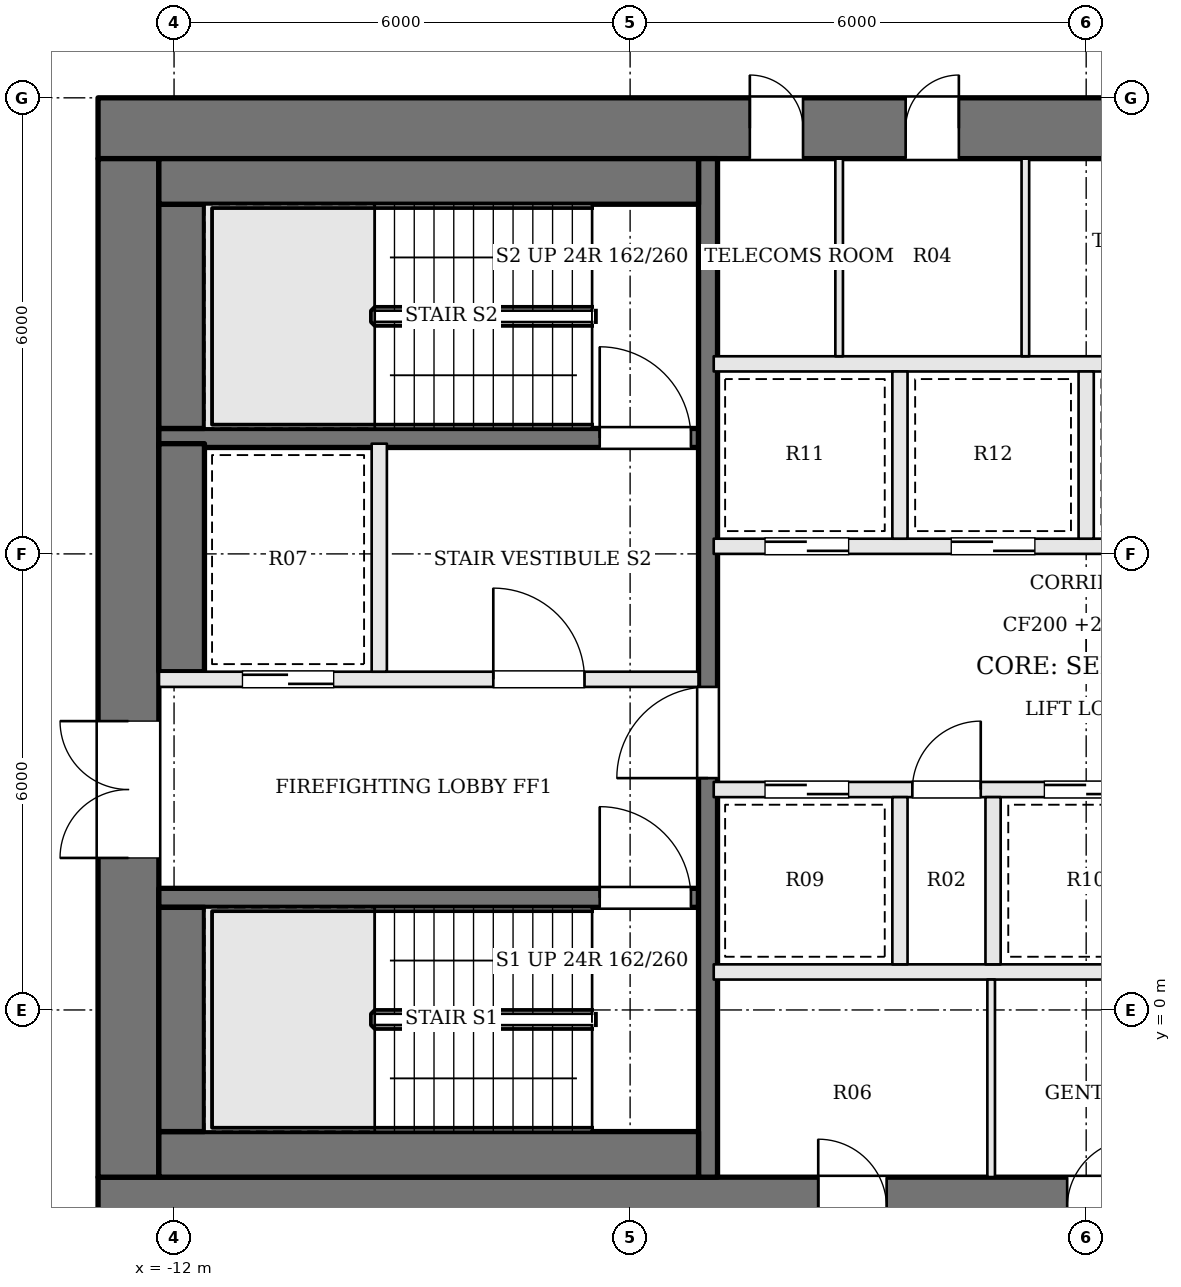
"""IFC4 building model, lengths in metres.
Left out: names, types, materials, properties, quantities, classifications, styles, units other than length and angle.
Written with IfcOpenShell. Run it as: python <this file> out.ifc"""

import sys

from ifc_helpers import new_model, si_unit, direction, frame, frame_2d, origin, place, context, subcontext, project, spatial, rectangle, extrude, element, fill, save


model = new_model("IFC4")
c1 = context("Model", 3, precision=1e-05, world=origin(), true_north=direction((0.0, 1.0)))
c2 = subcontext(c1, "Body", "Model", "MODEL_VIEW")
j1 = project(units=[si_unit("LENGTHUNIT", "METRE"), si_unit("PLANEANGLEUNIT", "RADIAN")], contexts=[c1])
p1 = place(None, origin())
s1 = spatial("IfcSite", under=j1, at=p1, CompositionType="ELEMENT")
p2 = place(p1, origin())
s2 = spatial("IfcBuilding", under=s1, at=p2, CompositionType="ELEMENT")
p3 = place(p2, frame((0.0, 0.0, 229.2)))
s3 = spatial("IfcBuildingStorey", under=s2, at=p3, CompositionType="ELEMENT", Elevation=229.2)
p4 = place(p3, frame((-13.0, 11.6, 0.0), z_axis=(0.0, 0.0, 1.0), x_axis=(1.0, 0.0, 0.0)))
e1 = element("IfcWall", 1, at=p4, inside=s3, PredefinedType="SHEAR", context=c2, shape_type="SweptSolid", body=[
    extrude(rectangle(XDim=26.0, YDim=0.8, at=frame_2d((13.0, 0.0))), origin(), (0.0, 0.0, 1.0), 3.9),
])
p5 = place(p4, frame((8.575, 0.0, 0.0)))
e2 = element("IfcOpeningElement", 2, at=p5, cuts=e1, PredefinedType="OPENING", context=c2, shape_type="SweptSolid", body=[
    extrude(rectangle(XDim=0.7, YDim=2.1, at=frame_2d((0.35, 1.05))), frame((0.0, 0.41, 0.0), z_axis=(0.0, -1.0, 0.0), x_axis=(1.0, 0.0, 0.0)), (0.0, 0.0, 1.0), 0.82),
])
p6 = place(p4, frame((10.625, 0.0, 0.0)))
e3 = element("IfcOpeningElement", 3, at=p6, cuts=e1, PredefinedType="OPENING", context=c2, shape_type="SweptSolid", body=[
    extrude(rectangle(XDim=0.7, YDim=2.1, at=frame_2d((0.35, 1.05))), frame((0.0, 0.41, 0.0), z_axis=(0.0, -1.0, 0.0), x_axis=(1.0, 0.0, 0.0)), (0.0, 0.0, 1.0), 0.82),
])
p7 = place(p4, frame((13.325, 0.0, 0.0)))
e4 = element("IfcOpeningElement", 4, at=p7, cuts=e1, PredefinedType="OPENING", context=c2, shape_type="SweptSolid", body=[
    extrude(rectangle(XDim=1.0, YDim=2.1, at=frame_2d((0.5, 1.05))), frame((0.0, 0.41, 0.0), z_axis=(0.0, -1.0, 0.0), x_axis=(1.0, 0.0, 0.0)), (0.0, 0.0, 1.0), 0.82),
])
p8 = place(p4, frame((15.65, 0.0, 0.0)))
e5 = element("IfcOpeningElement", 5, at=p8, cuts=e1, PredefinedType="OPENING", context=c2, shape_type="SweptSolid", body=[
    extrude(rectangle(XDim=1.0, YDim=2.1, at=frame_2d((0.5, 1.05))), frame((0.0, 0.41, 0.0), z_axis=(0.0, -1.0, 0.0), x_axis=(1.0, 0.0, 0.0)), (0.0, 0.0, 1.0), 0.82),
])
p9 = place(p3, frame((-13.0, -2.6, 0.0), z_axis=(0.0, 0.0, 1.0), x_axis=(1.0, 0.0, 0.0)))
e6 = element("IfcWall", 6, at=p9, inside=s3, PredefinedType="SHEAR", context=c2, shape_type="SweptSolid", body=[
    extrude(rectangle(XDim=26.0, YDim=0.8, at=frame_2d((13.0, 0.0))), origin(), (0.0, 0.0, 1.0), 3.9),
])
p10 = place(p9, frame((9.475, 0.0, 0.0)))
e7 = element("IfcOpeningElement", 7, at=p10, cuts=e6, PredefinedType="OPENING", context=c2, shape_type="SweptSolid", body=[
    extrude(rectangle(XDim=0.9, YDim=2.1, at=frame_2d((0.45, 1.05))), frame((0.0, 0.41, 0.0), z_axis=(0.0, -1.0, 0.0), x_axis=(1.0, 0.0, 0.0)), (0.0, 0.0, 1.0), 0.82),
])
p11 = place(p9, frame((12.75, 0.0, 0.0)))
e8 = element("IfcOpeningElement", 8, at=p11, cuts=e6, PredefinedType="OPENING", context=c2, shape_type="SweptSolid", body=[
    extrude(rectangle(XDim=0.9, YDim=2.1, at=frame_2d((0.45, 1.05))), frame((0.0, 0.41, 0.0), z_axis=(0.0, -1.0, 0.0), x_axis=(1.0, 0.0, 0.0)), (0.0, 0.0, 1.0), 0.82),
])
p12 = place(p9, frame((15.05, 0.0, 0.0)))
e9 = element("IfcOpeningElement", 9, at=p12, cuts=e6, PredefinedType="OPENING", context=c2, shape_type="SweptSolid", body=[
    extrude(rectangle(XDim=1.0, YDim=2.1, at=frame_2d((0.5, 1.05))), frame((0.0, 0.41, 0.0), z_axis=(0.0, -1.0, 0.0), x_axis=(1.0, 0.0, 0.0)), (0.0, 0.0, 1.0), 0.82),
])
p13 = place(p9, frame((16.825, 0.0, 0.0)))
e10 = element("IfcOpeningElement", 10, at=p13, cuts=e6, PredefinedType="OPENING", context=c2, shape_type="SweptSolid", body=[
    extrude(rectangle(XDim=0.7, YDim=2.1, at=frame_2d((0.35, 1.05))), frame((0.0, 0.41, 0.0), z_axis=(0.0, -1.0, 0.0), x_axis=(1.0, 0.0, 0.0)), (0.0, 0.0, 1.0), 0.82),
])
p14 = place(p3, frame((-12.6, -2.2, 0.0), z_axis=(0.0, 0.0, 1.0), x_axis=(0.0, 1.0, 0.0)))
e11 = element("IfcWall", 11, at=p14, inside=s3, PredefinedType="SHEAR", context=c2, shape_type="SweptSolid", body=[
    extrude(rectangle(XDim=13.4, YDim=0.8, at=frame_2d((6.7, 0.0))), origin(), (0.0, 0.0, 1.0), 3.9),
])
p15 = place(p14, frame((4.2, 0.0, 0.0)))
e12 = element("IfcOpeningElement", 12, at=p15, cuts=e11, PredefinedType="OPENING", context=c2, shape_type="SweptSolid", body=[
    extrude(rectangle(XDim=1.8, YDim=2.1, at=frame_2d((0.9, 1.05))), frame((0.0, 0.41, 0.0), z_axis=(0.0, -1.0, 0.0), x_axis=(1.0, 0.0, 0.0)), (0.0, 0.0, 1.0), 0.82),
])
p16 = place(p3, frame((-12.2, 1.475, 0.0), z_axis=(0.0, 0.0, 1.0), x_axis=(1.0, 0.0, 0.0)))
e13 = element("IfcWall", 13, at=p16, inside=s3, PredefinedType="SOLIDWALL", context=c2, shape_type="SweptSolid", body=[
    extrude(rectangle(XDim=7.1, YDim=0.25, at=frame_2d((3.55, 0.0))), origin(), (0.0, 0.0, 1.0), 3.7),
])
p17 = place(p16, frame((5.8, 0.0, 0.0)))
e14 = element("IfcOpeningElement", 14, at=p17, cuts=e13, PredefinedType="OPENING", context=c2, shape_type="SweptSolid", body=[
    extrude(rectangle(XDim=1.2, YDim=2.1, at=frame_2d((0.6, 1.05))), frame((0.0, 0.135, 0.0), z_axis=(0.0, -1.0, 0.0), x_axis=(1.0, 0.0, 0.0)), (0.0, 0.0, 1.0), 0.27),
])
p18 = place(p3, frame((-12.2, 4.35, 0.0), z_axis=(0.0, 0.0, 1.0), x_axis=(1.0, 0.0, 0.0)))
e15 = element("IfcWall", 15, at=p18, inside=s3, PredefinedType="SOLIDWALL", context=c2, shape_type="SweptSolid", body=[
    extrude(rectangle(XDim=7.1, YDim=0.2, at=frame_2d((3.55, 0.0))), origin(), (0.0, 0.0, 1.0), 3.7),
])
p19 = place(p18, frame((4.4, 0.0, 0.0)))
e16 = element("IfcOpeningElement", 16, at=p19, cuts=e15, PredefinedType="OPENING", context=c2, shape_type="SweptSolid", body=[
    extrude(rectangle(XDim=1.2, YDim=2.1, at=frame_2d((0.6, 1.05))), frame((0.0, 0.11, 0.0), z_axis=(0.0, -1.0, 0.0), x_axis=(1.0, 0.0, 0.0)), (0.0, 0.0, 1.0), 0.22),
])
p20 = place(p18, frame((1.1, 0.0, 0.0)))
e17 = element("IfcOpeningElement", 17, at=p20, cuts=e15, PredefinedType="OPENING", context=c2, shape_type="SweptSolid", body=[
    extrude(rectangle(XDim=1.2, YDim=2.1, at=frame_2d((0.6, 1.05))), frame((0.0, 0.11, 0.0), z_axis=(0.0, -1.0, 0.0), x_axis=(1.0, 0.0, 0.0)), (0.0, 0.0, 1.0), 0.22),
])
p21 = place(p3, frame((-12.2, 7.525, 0.0), z_axis=(0.0, 0.0, 1.0), x_axis=(1.0, 0.0, 0.0)))
e18 = element("IfcWall", 18, at=p21, inside=s3, PredefinedType="SOLIDWALL", context=c2, shape_type="SweptSolid", body=[
    extrude(rectangle(XDim=7.1, YDim=0.25, at=frame_2d((3.55, 0.0))), origin(), (0.0, 0.0, 1.0), 3.7),
])
p22 = place(p21, frame((5.8, 0.0, 0.0)))
e19 = element("IfcOpeningElement", 19, at=p22, cuts=e18, PredefinedType="OPENING", context=c2, shape_type="SweptSolid", body=[
    extrude(rectangle(XDim=1.2, YDim=2.1, at=frame_2d((0.6, 1.05))), frame((0.0, 0.135, 0.0), z_axis=(0.0, -1.0, 0.0), x_axis=(1.0, 0.0, 0.0)), (0.0, 0.0, 1.0), 0.27),
])
p23 = place(p3, frame((-9.3, 4.45, 0.0), z_axis=(0.0, 0.0, 1.0), x_axis=(0.0, 1.0, 0.0)))
e20 = element("IfcWall", 20, at=p23, inside=s3, PredefinedType="SOLIDWALL", context=c2, shape_type="SweptSolid", body=[
    extrude(rectangle(XDim=3.0, YDim=0.2, at=frame_2d((1.5, 0.0))), origin(), (0.0, 0.0, 1.0), 3.7),
])
p24 = place(p3, frame((-4.975, -2.2, 0.0), z_axis=(0.0, 0.0, 1.0), x_axis=(0.0, 1.0, 0.0)))
e21 = element("IfcWall", 21, at=p24, inside=s3, PredefinedType="SOLIDWALL", context=c2, shape_type="SweptSolid", body=[
    extrude(rectangle(XDim=13.4, YDim=0.25, at=frame_2d((6.7, 0.0))), origin(), (0.0, 0.0, 1.0), 3.7),
])
p25 = place(p24, frame((5.25, 0.0, 0.0)))
e22 = element("IfcOpeningElement", 22, at=p25, cuts=e21, PredefinedType="OPENING", context=c2, shape_type="SweptSolid", body=[
    extrude(rectangle(XDim=1.2, YDim=2.1, at=frame_2d((0.6, 1.05))), frame((0.0, 0.135, 0.0), z_axis=(0.0, -1.0, 0.0), x_axis=(1.0, 0.0, 0.0)), (0.0, 0.0, 1.0), 0.27),
])
p26 = place(p3, frame((-12.2, -1.9, 0.0), z_axis=(0.0, 0.0, 1.0), x_axis=(1.0, 0.0, 0.0)))
e23 = element("IfcWall", 23, at=p26, inside=s3, PredefinedType="SOLIDWALL", context=c2, shape_type="SweptSolid", body=[
    extrude(rectangle(XDim=7.1, YDim=0.6, at=frame_2d((3.55, 0.0))), origin(), (0.0, 0.0, 1.0), 3.7),
])
p27 = place(p3, frame((-11.9, -1.6, 0.0), z_axis=(0.0, 0.0, 1.0), x_axis=(0.0, 1.0, 0.0)))
e24 = element("IfcWall", 24, at=p27, inside=s3, PredefinedType="SOLIDWALL", context=c2, shape_type="SweptSolid", body=[
    extrude(rectangle(XDim=2.95, YDim=0.6, at=frame_2d((1.475, 0.0))), origin(), (0.0, 0.0, 1.0), 3.7),
])
p28 = place(p3, frame((-11.9, 4.45, 0.0), z_axis=(0.0, 0.0, 1.0), x_axis=(0.0, 1.0, 0.0)))
e25 = element("IfcWall", 25, at=p28, inside=s3, PredefinedType="SOLIDWALL", context=c2, shape_type="SweptSolid", body=[
    extrude(rectangle(XDim=3.0, YDim=0.6, at=frame_2d((1.5, 0.0))), origin(), (0.0, 0.0, 1.0), 3.7),
])
p29 = place(p3, frame((-11.9, 7.65, 0.0), z_axis=(0.0, 0.0, 1.0), x_axis=(0.0, 1.0, 0.0)))
e26 = element("IfcWall", 26, at=p29, inside=s3, PredefinedType="SOLIDWALL", context=c2, shape_type="SweptSolid", body=[
    extrude(rectangle(XDim=2.95, YDim=0.6, at=frame_2d((1.475, 0.0))), origin(), (0.0, 0.0, 1.0), 3.7),
])
p30 = place(p3, frame((-12.2, 10.9, 0.0), z_axis=(0.0, 0.0, 1.0), x_axis=(1.0, 0.0, 0.0)))
e27 = element("IfcWall", 27, at=p30, inside=s3, PredefinedType="SOLIDWALL", context=c2, shape_type="SweptSolid", body=[
    extrude(rectangle(XDim=7.1, YDim=0.6, at=frame_2d((3.55, 0.0))), origin(), (0.0, 0.0, 1.0), 3.7),
])
p31 = place(p3, frame((-4.9, 0.5, 0.0), z_axis=(0.0, 0.0, 1.0), x_axis=(1.0, 0.0, 0.0)))
e28 = element("IfcWall", 28, at=p31, inside=s3, PredefinedType="SOLIDWALL", context=c2, shape_type="SweptSolid", body=[
    extrude(rectangle(XDim=9.8, YDim=0.2, at=frame_2d((4.9, 0.0))), origin(), (0.0, 0.0, 1.0), 3.7),
])
p32 = place(p3, frame((-4.9, 2.9, 0.0), z_axis=(0.0, 0.0, 1.0), x_axis=(1.0, 0.0, 0.0)))
e29 = element("IfcWall", 29, at=p32, inside=s3, PredefinedType="SOLIDWALL", context=c2, shape_type="SweptSolid", body=[
    extrude(rectangle(XDim=9.8, YDim=0.2, at=frame_2d((4.9, 0.0))), origin(), (0.0, 0.0, 1.0), 3.7),
])
p33 = place(p32, frame((0.675, 0.0, 0.0)))
e30 = element("IfcOpeningElement", 30, at=p33, cuts=e29, PredefinedType="OPENING", context=c2, shape_type="SweptSolid", body=[
    extrude(rectangle(XDim=1.1, YDim=2.1, at=frame_2d((0.55, 1.05))), frame((0.0, 0.11, 0.0), z_axis=(0.0, -1.0, 0.0), x_axis=(1.0, 0.0, 0.0)), (0.0, 0.0, 1.0), 0.22),
])
p34 = place(p32, frame((2.613, 0.0, 0.0)))
e31 = element("IfcOpeningElement", 31, at=p34, cuts=e29, PredefinedType="OPENING", context=c2, shape_type="SweptSolid", body=[
    extrude(rectangle(XDim=0.9, YDim=2.1, at=frame_2d((0.45, 1.05))), frame((0.0, 0.11, 0.0), z_axis=(0.0, -1.0, 0.0), x_axis=(1.0, 0.0, 0.0)), (0.0, 0.0, 1.0), 0.22),
])
p35 = place(p32, frame((4.35, 0.0, 0.0)))
e32 = element("IfcOpeningElement", 32, at=p35, cuts=e29, PredefinedType="OPENING", context=c2, shape_type="SweptSolid", body=[
    extrude(rectangle(XDim=1.1, YDim=2.1, at=frame_2d((0.55, 1.05))), frame((0.0, 0.11, 0.0), z_axis=(0.0, -1.0, 0.0), x_axis=(1.0, 0.0, 0.0)), (0.0, 0.0, 1.0), 0.22),
])
p36 = place(p32, frame((7.463, 0.0, 0.0)))
e33 = element("IfcOpeningElement", 33, at=p36, cuts=e29, PredefinedType="OPENING", context=c2, shape_type="SweptSolid", body=[
    extrude(rectangle(XDim=1.0, YDim=2.1, at=frame_2d((0.5, 1.05))), frame((0.0, 0.11, 0.0), z_axis=(0.0, -1.0, 0.0), x_axis=(1.0, 0.0, 0.0)), (0.0, 0.0, 1.0), 0.22),
])
p37 = place(p3, frame((-4.9, 6.1, 0.0), z_axis=(0.0, 0.0, 1.0), x_axis=(1.0, 0.0, 0.0)))
e34 = element("IfcWall", 34, at=p37, inside=s3, PredefinedType="SOLIDWALL", context=c2, shape_type="SweptSolid", body=[
    extrude(rectangle(XDim=9.8, YDim=0.2, at=frame_2d((4.9, 0.0))), origin(), (0.0, 0.0, 1.0), 3.7),
])
p38 = place(p37, frame((0.675, 0.0, 0.0)))
e35 = element("IfcOpeningElement", 35, at=p38, cuts=e34, PredefinedType="OPENING", context=c2, shape_type="SweptSolid", body=[
    extrude(rectangle(XDim=1.1, YDim=2.1, at=frame_2d((0.55, 1.05))), frame((0.0, 0.11, 0.0), z_axis=(0.0, -1.0, 0.0), x_axis=(1.0, 0.0, 0.0)), (0.0, 0.0, 1.0), 0.22),
])
p39 = place(p37, frame((3.125, 0.0, 0.0)))
e36 = element("IfcOpeningElement", 36, at=p39, cuts=e34, PredefinedType="OPENING", context=c2, shape_type="SweptSolid", body=[
    extrude(rectangle(XDim=1.1, YDim=2.1, at=frame_2d((0.55, 1.05))), frame((0.0, 0.11, 0.0), z_axis=(0.0, -1.0, 0.0), x_axis=(1.0, 0.0, 0.0)), (0.0, 0.0, 1.0), 0.22),
])
p40 = place(p37, frame((5.575, 0.0, 0.0)))
e37 = element("IfcOpeningElement", 37, at=p40, cuts=e34, PredefinedType="OPENING", context=c2, shape_type="SweptSolid", body=[
    extrude(rectangle(XDim=1.1, YDim=2.1, at=frame_2d((0.55, 1.05))), frame((0.0, 0.11, 0.0), z_axis=(0.0, -1.0, 0.0), x_axis=(1.0, 0.0, 0.0)), (0.0, 0.0, 1.0), 0.22),
])
p41 = place(p37, frame((8.025, 0.0, 0.0)))
e38 = element("IfcOpeningElement", 38, at=p41, cuts=e34, PredefinedType="OPENING", context=c2, shape_type="SweptSolid", body=[
    extrude(rectangle(XDim=1.1, YDim=2.1, at=frame_2d((0.55, 1.05))), frame((0.0, 0.11, 0.0), z_axis=(0.0, -1.0, 0.0), x_axis=(1.0, 0.0, 0.0)), (0.0, 0.0, 1.0), 0.22),
])
p42 = place(p3, frame((-4.9, 8.5, 0.0), z_axis=(0.0, 0.0, 1.0), x_axis=(1.0, 0.0, 0.0)))
e39 = element("IfcWall", 39, at=p42, inside=s3, PredefinedType="SOLIDWALL", context=c2, shape_type="SweptSolid", body=[
    extrude(rectangle(XDim=9.8, YDim=0.2, at=frame_2d((4.9, 0.0))), origin(), (0.0, 0.0, 1.0), 3.7),
])
for number, where, z_axis, x_axis in (
    (40, (-2.45, 0.6, 0.0), (0.0, 0.0, 1.0), (0.0, 1.0, 0.0)),
    (41, (-1.225, 0.6, 0.0), (0.0, 0.0, 1.0), (0.0, 1.0, 0.0)),
    (42, (-2.45, 6.2, 0.0), (0.0, 0.0, 1.0), (0.0, 1.0, 0.0)),
    (43, (0.0, 6.2, 0.0), (0.0, 0.0, 1.0), (0.0, 1.0, 0.0)),
):
    element("IfcWall", number, at=place(p3, frame(where, z_axis=z_axis, x_axis=x_axis)), inside=s3, PredefinedType="SOLIDWALL", context=c2, shape_type="SweptSolid", body=[
        extrude(rectangle(XDim=2.2, YDim=0.2, at=frame_2d((1.1, 0.0))), origin(), (0.0, 0.0, 1.0), 3.7),
    ])
for number, where, z_axis, x_axis in (
    (44, (-1.25, -2.2, 0.0), (0.0, 0.0, 1.0), (0.0, 1.0, 0.0)),
    (45, (-3.25, 8.6, 0.0), (0.0, 0.0, 1.0), (0.0, 1.0, 0.0)),
    (46, (-0.8, 8.6, 0.0), (0.0, 0.0, 1.0), (0.0, 1.0, 0.0)),
):
    element("IfcWall", number, at=place(p3, frame(where, z_axis=z_axis, x_axis=x_axis)), inside=s3, PredefinedType="PARTITIONING", context=c2, shape_type="SweptSolid", body=[
        extrude(rectangle(XDim=2.6, YDim=0.1, at=frame_2d((1.3, 0.0))), origin(), (0.0, 0.0, 1.0), 3.7),
    ])
p43 = place(p15, origin())
e47 = element("IfcDoor", 47, at=p43, inside=s3, OperationType="DOUBLE_DOOR_SINGLE_SWING", PredefinedType="DOOR", context=c2, shape_type="SweptSolid", body=[
    extrude(rectangle(XDim=1.8, YDim=2.1, at=frame_2d((0.9, 1.05))), frame((0.0, 0.025, 0.0), z_axis=(0.0, -1.0, 0.0), x_axis=(1.0, 0.0, 0.0)), (0.0, 0.0, 1.0), 0.05),
])
fill(e12, e47)
p44 = place(p25, origin())
e48 = element("IfcDoor", 48, at=p44, inside=s3, OperationType="SINGLE_SWING_LEFT", PredefinedType="DOOR", context=c2, shape_type="SweptSolid", body=[
    extrude(rectangle(XDim=1.2, YDim=2.1, at=frame_2d((0.6, 1.05))), frame((0.0, 0.025, 0.0), z_axis=(0.0, -1.0, 0.0), x_axis=(1.0, 0.0, 0.0)), (0.0, 0.0, 1.0), 0.05),
])
fill(e22, e48)
p45 = place(p19, origin())
e49 = element("IfcDoor", 49, at=p45, inside=s3, OperationType="SINGLE_SWING_LEFT", PredefinedType="DOOR", context=c2, shape_type="SweptSolid", body=[
    extrude(rectangle(XDim=1.2, YDim=2.1, at=frame_2d((0.6, 1.05))), frame((0.0, 0.025, 0.0), z_axis=(0.0, -1.0, 0.0), x_axis=(1.0, 0.0, 0.0)), (0.0, 0.0, 1.0), 0.05),
])
fill(e16, e49)
p46 = place(p17, origin())
e50 = element("IfcDoor", 50, at=p46, inside=s3, OperationType="SINGLE_SWING_LEFT", PredefinedType="DOOR", context=c2, shape_type="SweptSolid", body=[
    extrude(rectangle(XDim=1.2, YDim=2.1, at=frame_2d((0.6, 1.05))), frame((0.0, 0.025, 0.0), z_axis=(0.0, -1.0, 0.0), x_axis=(1.0, 0.0, 0.0)), (0.0, 0.0, 1.0), 0.05),
])
fill(e14, e50)
p47 = place(p22, origin())
e51 = element("IfcDoor", 51, at=p47, inside=s3, OperationType="SINGLE_SWING_LEFT", PredefinedType="DOOR", context=c2, shape_type="SweptSolid", body=[
    extrude(rectangle(XDim=1.2, YDim=2.1, at=frame_2d((0.6, 1.05))), frame((0.0, 0.025, 0.0), z_axis=(0.0, -1.0, 0.0), x_axis=(1.0, 0.0, 0.0)), (0.0, 0.0, 1.0), 0.05),
])
fill(e19, e51)
p48 = place(p20, origin())
e52 = element("IfcDoor", 52, at=p48, inside=s3, OperationType="SLIDING_TO_RIGHT", PredefinedType="DOOR", context=c2, shape_type="SweptSolid", body=[
    extrude(rectangle(XDim=1.2, YDim=2.1, at=frame_2d((0.6, 1.05))), frame((0.0, 0.025, 0.0), z_axis=(0.0, -1.0, 0.0), x_axis=(1.0, 0.0, 0.0)), (0.0, 0.0, 1.0), 0.05),
])
fill(e17, e52)
p49 = place(p33, origin())
e53 = element("IfcDoor", 53, at=p49, inside=s3, OperationType="SLIDING_TO_RIGHT", PredefinedType="DOOR", context=c2, shape_type="SweptSolid", body=[
    extrude(rectangle(XDim=1.1, YDim=2.1, at=frame_2d((0.55, 1.05))), frame((0.0, 0.025, 0.0), z_axis=(0.0, -1.0, 0.0), x_axis=(1.0, 0.0, 0.0)), (0.0, 0.0, 1.0), 0.05),
])
fill(e30, e53)
p50 = place(p34, origin())
e54 = element("IfcDoor", 54, at=p50, inside=s3, OperationType="SINGLE_SWING_RIGHT", PredefinedType="DOOR", context=c2, shape_type="SweptSolid", body=[
    extrude(rectangle(XDim=0.9, YDim=2.1, at=frame_2d((0.45, 1.05))), frame((0.0, 0.025, 0.0), z_axis=(0.0, -1.0, 0.0), x_axis=(1.0, 0.0, 0.0)), (0.0, 0.0, 1.0), 0.05),
])
fill(e31, e54)
p51 = place(p35, origin())
e55 = element("IfcDoor", 55, at=p51, inside=s3, OperationType="SLIDING_TO_LEFT", PredefinedType="DOOR", context=c2, shape_type="SweptSolid", body=[
    extrude(rectangle(XDim=1.1, YDim=2.1, at=frame_2d((0.55, 1.05))), frame((0.0, 0.025, 0.0), z_axis=(0.0, -1.0, 0.0), x_axis=(1.0, 0.0, 0.0)), (0.0, 0.0, 1.0), 0.05),
])
fill(e32, e55)
p52 = place(p38, origin())
e56 = element("IfcDoor", 56, at=p52, inside=s3, OperationType="SLIDING_TO_RIGHT", PredefinedType="DOOR", context=c2, shape_type="SweptSolid", body=[
    extrude(rectangle(XDim=1.1, YDim=2.1, at=frame_2d((0.55, 1.05))), frame((0.0, 0.025, 0.0), z_axis=(0.0, -1.0, 0.0), x_axis=(1.0, 0.0, 0.0)), (0.0, 0.0, 1.0), 0.05),
])
fill(e35, e56)
p53 = place(p39, origin())
e57 = element("IfcDoor", 57, at=p53, inside=s3, OperationType="SLIDING_TO_LEFT", PredefinedType="DOOR", context=c2, shape_type="SweptSolid", body=[
    extrude(rectangle(XDim=1.1, YDim=2.1, at=frame_2d((0.55, 1.05))), frame((0.0, 0.025, 0.0), z_axis=(0.0, -1.0, 0.0), x_axis=(1.0, 0.0, 0.0)), (0.0, 0.0, 1.0), 0.05),
])
fill(e36, e57)
p54 = place(p10, origin())
e58 = element("IfcDoor", 58, at=p54, inside=s3, OperationType="SINGLE_SWING_LEFT", PredefinedType="DOOR", context=c2, shape_type="SweptSolid", body=[
    extrude(rectangle(XDim=0.9, YDim=2.1, at=frame_2d((0.45, 1.05))), frame((0.0, 0.025, 0.0), z_axis=(0.0, -1.0, 0.0), x_axis=(1.0, 0.0, 0.0)), (0.0, 0.0, 1.0), 0.05),
])
fill(e7, e58)
p55 = place(p11, origin())
e59 = element("IfcDoor", 59, at=p55, inside=s3, OperationType="SINGLE_SWING_RIGHT", PredefinedType="DOOR", context=c2, shape_type="SweptSolid", body=[
    extrude(rectangle(XDim=0.9, YDim=2.1, at=frame_2d((0.45, 1.05))), frame((0.0, 0.025, 0.0), z_axis=(0.0, -1.0, 0.0), x_axis=(1.0, 0.0, 0.0)), (0.0, 0.0, 1.0), 0.05),
])
fill(e8, e59)
p56 = place(p5, origin())
e60 = element("IfcDoor", 60, at=p56, inside=s3, OperationType="SINGLE_SWING_LEFT", PredefinedType="DOOR", context=c2, shape_type="SweptSolid", body=[
    extrude(rectangle(XDim=0.7, YDim=2.1, at=frame_2d((0.35, 1.05))), frame((0.0, 0.025, 0.0), z_axis=(0.0, -1.0, 0.0), x_axis=(1.0, 0.0, 0.0)), (0.0, 0.0, 1.0), 0.05),
])
fill(e2, e60)
p57 = place(p6, origin())
e61 = element("IfcDoor", 61, at=p57, inside=s3, OperationType="SINGLE_SWING_RIGHT", PredefinedType="DOOR", context=c2, shape_type="SweptSolid", body=[
    extrude(rectangle(XDim=0.7, YDim=2.1, at=frame_2d((0.35, 1.05))), frame((0.0, 0.025, 0.0), z_axis=(0.0, -1.0, 0.0), x_axis=(1.0, 0.0, 0.0)), (0.0, 0.0, 1.0), 0.05),
])
fill(e3, e61)
save(model, sys.argv[1])
